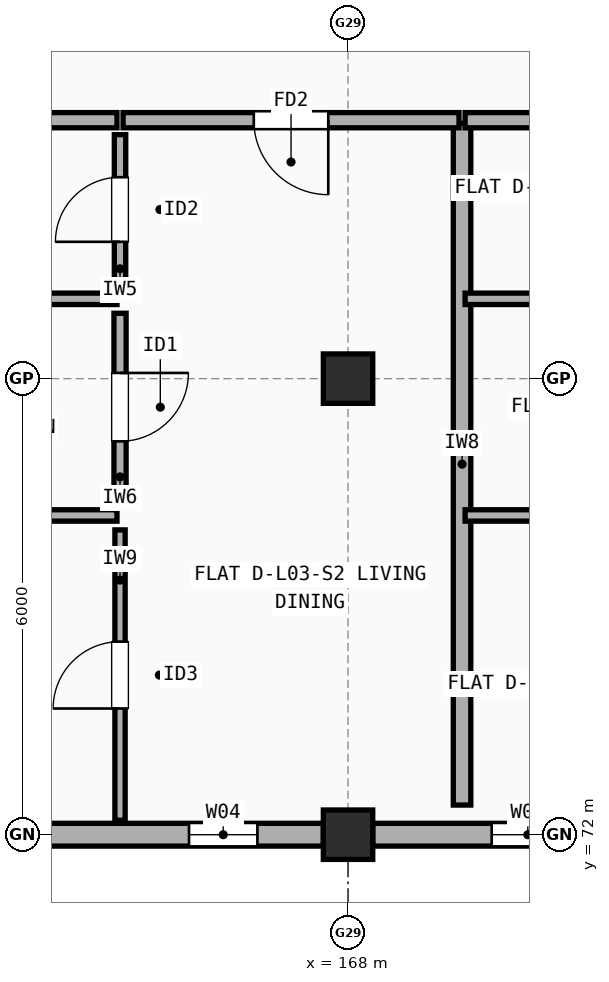
"""IFC4 building model, lengths in metres.
Left out: names, types, materials, properties, quantities, classifications, styles, units other than length and angle.
Written with IfcOpenShell. Run it as: python <this file> out.ifc"""

import sys

from ifc_helpers import new_model, si_unit, direction, frame, frame_2d, origin, origin_2d, place, context, subcontext, project, spatial, rectangle, extrude, element, fill, save


model = new_model("IFC4")
c1 = context("Model", 3, precision=1e-05, world=origin(), true_north=direction((0.0, 1.0)))
c2 = subcontext(c1, "Body", "Model", "MODEL_VIEW")
j1 = project(units=[si_unit("LENGTHUNIT", "METRE"), si_unit("PLANEANGLEUNIT", "RADIAN")], contexts=[c1])
p1 = place(None, origin())
s1 = spatial("IfcSite", under=j1, at=p1, CompositionType="ELEMENT")
p2 = place(p1, origin())
s2 = spatial("IfcBuilding", under=s1, at=p2, CompositionType="ELEMENT")
p3 = place(p2, frame((0.0, 0.0, 10.9)))
s3 = spatial("IfcBuildingStorey", under=s2, at=p3, CompositionType="ELEMENT", Elevation=10.9)
for number, where, z_axis, x_axis in (
    (1, (168.0, 72.0, 0.0), (0.0, 0.0, 1.0), (1.0, 0.0, 0.0)),
    (2, (168.0, 78.0, 0.0), (0.0, 0.0, 1.0), (1.0, 0.0, 0.0)),
):
    element("IfcColumn", number, at=place(p3, frame(where, z_axis=z_axis, x_axis=x_axis)), inside=s3, PredefinedType="COLUMN", context=c2, shape_type="SweptSolid", body=[
        extrude(rectangle(XDim=0.65, YDim=0.65, at=origin_2d()), origin(), (0.0, 0.0, 1.0), 2.96),
    ])
p4 = place(p3, frame((162.325, 72.0, 0.0), z_axis=(0.0, 0.0, 1.0), x_axis=(1.0, 0.0, 0.0)))
e3 = element("IfcWall", 3, at=p4, inside=s3, PredefinedType="STANDARD", context=c2, shape_type="SweptSolid", body=[
    extrude(rectangle(XDim=5.35, YDim=0.3, at=frame_2d((2.675, 0.0))), origin(), (0.0, 0.0, 1.0), 2.442),
])
p5 = place(p4, frame((0.893, 0.0, 0.9)))
e4 = element("IfcOpeningElement", 4, at=p5, cuts=e3, PredefinedType="OPENING", context=c2, shape_type="SweptSolid", body=[
    extrude(rectangle(XDim=0.85, YDim=1.25, at=frame_2d((0.425, 0.625))), frame((0.0, 0.16, 0.0), z_axis=(0.0, -1.0, 0.0), x_axis=(1.0, 0.0, 0.0)), (0.0, 0.0, 1.0), 0.32),
])
p6 = place(p4, frame((3.583, 0.0, 0.9)))
e5 = element("IfcOpeningElement", 5, at=p6, cuts=e3, PredefinedType="OPENING", context=c2, shape_type="SweptSolid", body=[
    extrude(rectangle(XDim=0.9, YDim=1.3, at=frame_2d((0.45, 0.65))), frame((0.0, 0.16, 0.0), z_axis=(0.0, -1.0, 0.0), x_axis=(1.0, 0.0, 0.0)), (0.0, 0.0, 1.0), 0.32),
])
p7 = place(p3, frame((168.325, 72.0, 0.0), z_axis=(0.0, 0.0, 1.0), x_axis=(1.0, 0.0, 0.0)))
e6 = element("IfcWall", 6, at=p7, inside=s3, PredefinedType="STANDARD", context=c2, shape_type="SweptSolid", body=[
    extrude(rectangle(XDim=5.35, YDim=0.3, at=frame_2d((2.675, 0.0))), origin(), (0.0, 0.0, 1.0), 2.442),
])
p8 = place(p7, frame((1.565, 0.0, 0.9)))
e7 = element("IfcOpeningElement", 7, at=p8, cuts=e6, PredefinedType="OPENING", context=c2, shape_type="SweptSolid", body=[
    extrude(rectangle(XDim=0.95, YDim=1.35, at=frame_2d((0.475, 0.675))), frame((0.0, 0.16, 0.0), z_axis=(0.0, -1.0, 0.0), x_axis=(1.0, 0.0, 0.0)), (0.0, 0.0, 1.0), 0.32),
])
p9 = place(p7, frame((4.05, 0.0, 0.9)))
e8 = element("IfcOpeningElement", 8, at=p9, cuts=e6, PredefinedType="OPENING", context=c2, shape_type="SweptSolid", body=[
    extrude(rectangle(XDim=0.95, YDim=1.35, at=frame_2d((0.475, 0.675))), frame((0.0, 0.16, 0.0), z_axis=(0.0, -1.0, 0.0), x_axis=(1.0, 0.0, 0.0)), (0.0, 0.0, 1.0), 0.32),
])
p10 = place(p3, frame((169.5, 72.39, 0.0), z_axis=(0.0, 0.0, 1.0), x_axis=(0.0, 1.0, 0.0)))
e9 = element("IfcWall", 9, at=p10, inside=s3, PredefinedType="SOLIDWALL", context=c2, shape_type="SweptSolid", body=[
    extrude(rectangle(XDim=8.97, YDim=0.23, at=frame_2d((4.485, 0.0))), origin(), (0.0, 0.0, 1.0), 2.442),
])
p11 = place(p3, frame((160.54, 81.4, 0.0), z_axis=(0.0, 0.0, 1.0), x_axis=(1.0, 0.0, 0.0)))
e10 = element("IfcWall", 10, at=p11, inside=s3, PredefinedType="SOLIDWALL", context=c2, shape_type="SweptSolid", body=[
    extrude(rectangle(XDim=4.42, YDim=0.2, at=frame_2d((2.21, 0.0))), origin(), (0.0, 0.0, 1.0), 2.508),
])
p12 = place(p3, frame((165.04, 81.4, 0.0), z_axis=(0.0, 0.0, 1.0), x_axis=(1.0, 0.0, 0.0)))
e11 = element("IfcWall", 11, at=p12, inside=s3, PredefinedType="SOLIDWALL", context=c2, shape_type="SweptSolid", body=[
    extrude(rectangle(XDim=4.42, YDim=0.2, at=frame_2d((2.21, 0.0))), origin(), (0.0, 0.0, 1.0), 2.458),
])
p13 = place(p12, frame((1.72, 0.0, 0.0)))
e12 = element("IfcOpeningElement", 12, at=p13, cuts=e11, PredefinedType="OPENING", context=c2, shape_type="SweptSolid", body=[
    extrude(rectangle(XDim=0.98, YDim=2.15, at=frame_2d((0.49, 1.075))), frame((0.0, 0.11, 0.0), z_axis=(0.0, -1.0, 0.0), x_axis=(1.0, 0.0, 0.0)), (0.0, 0.0, 1.0), 0.22),
])
p14 = place(p3, frame((165.0, 72.19, 0.0), z_axis=(0.0, 0.0, 1.0), x_axis=(0.0, 1.0, 0.0)))
e13 = element("IfcWall", 13, at=p14, inside=s3, PredefinedType="PARTITIONING", context=c2, shape_type="SweptSolid", body=[
    extrude(rectangle(XDim=3.82, YDim=0.135, at=frame_2d((1.91, 0.0))), origin(), (0.0, 0.0, 1.0), 2.96),
])
p15 = place(p14, frame((1.47, 0.0, 0.0)))
e14 = element("IfcOpeningElement", 14, at=p15, cuts=e13, PredefinedType="OPENING", context=c2, shape_type="SweptSolid", body=[
    extrude(rectangle(XDim=0.88, YDim=2.1, at=frame_2d((0.44, 1.05))), frame((0.0, 0.077, 0.0), z_axis=(0.0, -1.0, 0.0), x_axis=(1.0, 0.0, 0.0)), (0.0, 0.0, 1.0), 0.155),
])
p16 = place(p3, frame((165.0, 76.39, 0.0), z_axis=(0.0, 0.0, 1.0), x_axis=(0.0, 1.0, 0.0)))
e15 = element("IfcWall", 15, at=p16, inside=s3, PredefinedType="PLUMBINGWALL", context=c2, shape_type="SweptSolid", body=[
    extrude(rectangle(XDim=2.47, YDim=0.16, at=frame_2d((1.235, 0.0))), origin(), (0.0, 0.0, 1.0), 2.442),
])
p17 = place(p16, frame((0.785, 0.0, 0.0)))
e16 = element("IfcOpeningElement", 16, at=p17, cuts=e15, PredefinedType="OPENING", context=c2, shape_type="SweptSolid", body=[
    extrude(rectangle(XDim=0.9, YDim=2.1, at=frame_2d((0.45, 1.05))), frame((0.0, 0.09, 0.0), z_axis=(0.0, -1.0, 0.0), x_axis=(1.0, 0.0, 0.0)), (0.0, 0.0, 1.0), 0.18),
])
p18 = place(p3, frame((165.0, 79.24, 0.0), z_axis=(0.0, 0.0, 1.0), x_axis=(0.0, 1.0, 0.0)))
e17 = element("IfcWall", 17, at=p18, inside=s3, PredefinedType="PARTITIONING", context=c2, shape_type="SweptSolid", body=[
    extrude(rectangle(XDim=1.97, YDim=0.15, at=frame_2d((0.985, 0.0))), origin(), (0.0, 0.0, 1.0), 2.96),
])
p19 = place(p18, frame((0.56, 0.0, 0.0)))
e18 = element("IfcOpeningElement", 18, at=p19, cuts=e17, PredefinedType="OPENING", context=c2, shape_type="SweptSolid", body=[
    extrude(rectangle(XDim=0.85, YDim=2.1, at=frame_2d((0.425, 1.05))), frame((0.0, 0.085, 0.0), z_axis=(0.0, -1.0, 0.0), x_axis=(1.0, 0.0, 0.0)), (0.0, 0.0, 1.0), 0.17),
])
p20 = place(p3, frame((160.54, 76.2, 0.0), z_axis=(0.0, 0.0, 1.0), x_axis=(1.0, 0.0, 0.0)))
e19 = element("IfcWall", 19, at=p20, inside=s3, PredefinedType="PARTITIONING", context=c2, shape_type="SweptSolid", body=[
    extrude(rectangle(XDim=4.42, YDim=0.15, at=frame_2d((2.21, 0.0))), origin(), (0.0, 0.0, 1.0), 2.548),
])
p21 = place(p3, frame((160.54, 79.05, 0.0), z_axis=(0.0, 0.0, 1.0), x_axis=(1.0, 0.0, 0.0)))
e20 = element("IfcWall", 20, at=p21, inside=s3, PredefinedType="PARTITIONING", context=c2, shape_type="SweptSolid", body=[
    extrude(rectangle(XDim=4.42, YDim=0.15, at=frame_2d((2.21, 0.0))), origin(), (0.0, 0.0, 1.0), 2.508),
])
p22 = place(p3, frame((169.54, 81.4, 0.0), z_axis=(0.0, 0.0, 1.0), x_axis=(1.0, 0.0, 0.0)))
e21 = element("IfcWall", 21, at=p22, inside=s3, PredefinedType="SOLIDWALL", context=c2, shape_type="SweptSolid", body=[
    extrude(rectangle(XDim=4.42, YDim=0.2, at=frame_2d((2.21, 0.0))), origin(), (0.0, 0.0, 1.0), 2.508),
])
p23 = place(p3, frame((169.54, 76.2, 0.0), z_axis=(0.0, 0.0, 1.0), x_axis=(1.0, 0.0, 0.0)))
e22 = element("IfcWall", 22, at=p23, inside=s3, PredefinedType="PARTITIONING", context=c2, shape_type="SweptSolid", body=[
    extrude(rectangle(XDim=4.42, YDim=0.15, at=frame_2d((2.21, 0.0))), origin(), (0.0, 0.0, 1.0), 2.548),
])
p24 = place(p3, frame((169.54, 79.05, 0.0), z_axis=(0.0, 0.0, 1.0), x_axis=(1.0, 0.0, 0.0)))
e23 = element("IfcWall", 23, at=p24, inside=s3, PredefinedType="PARTITIONING", context=c2, shape_type="SweptSolid", body=[
    extrude(rectangle(XDim=4.42, YDim=0.15, at=frame_2d((2.21, 0.0))), origin(), (0.0, 0.0, 1.0), 2.508),
])
p25 = place(p6, origin())
e24 = element("IfcWindow", 24, at=p25, inside=s3, PartitioningType="SINGLE_PANEL", PredefinedType="WINDOW", context=c2, shape_type="SweptSolid", body=[
    extrude(rectangle(XDim=0.9, YDim=1.3, at=frame_2d((0.45, 0.65))), frame((0.0, 0.03, 0.0), z_axis=(0.0, -1.0, 0.0), x_axis=(1.0, 0.0, 0.0)), (0.0, 0.0, 1.0), 0.06),
])
fill(e5, e24)
p26 = place(p8, origin())
e25 = element("IfcWindow", 25, at=p26, inside=s3, PartitioningType="SINGLE_PANEL", PredefinedType="WINDOW", context=c2, shape_type="SweptSolid", body=[
    extrude(rectangle(XDim=0.95, YDim=1.35, at=frame_2d((0.475, 0.675))), frame((0.0, 0.03, 0.0), z_axis=(0.0, -1.0, 0.0), x_axis=(1.0, 0.0, 0.0)), (0.0, 0.0, 1.0), 0.06),
])
fill(e7, e25)
p27 = place(p13, origin())
e26 = element("IfcDoor", 26, at=p27, inside=s3, OperationType="SINGLE_SWING_RIGHT", PredefinedType="DOOR", context=c2, shape_type="SweptSolid", body=[
    extrude(rectangle(XDim=0.98, YDim=2.15, at=frame_2d((0.49, 1.075))), frame((0.0, 0.025, 0.0), z_axis=(0.0, -1.0, 0.0), x_axis=(1.0, 0.0, 0.0)), (0.0, 0.0, 1.0), 0.05),
])
fill(e12, e26)
p28 = place(p15, origin())
e27 = element("IfcDoor", 27, at=p28, inside=s3, OperationType="SINGLE_SWING_LEFT", PredefinedType="DOOR", context=c2, shape_type="SweptSolid", body=[
    extrude(rectangle(XDim=0.88, YDim=2.1, at=frame_2d((0.44, 1.05))), frame((0.0, 0.025, 0.0), z_axis=(0.0, -1.0, 0.0), x_axis=(1.0, 0.0, 0.0)), (0.0, 0.0, 1.0), 0.05),
])
fill(e14, e27)
p29 = place(p17, origin())
e28 = element("IfcDoor", 28, at=p29, inside=s3, OperationType="SINGLE_SWING_RIGHT", PredefinedType="DOOR", context=c2, shape_type="SweptSolid", body=[
    extrude(rectangle(XDim=0.9, YDim=2.1, at=frame_2d((0.45, 1.05))), frame((0.0, 0.025, 0.0), z_axis=(0.0, -1.0, 0.0), x_axis=(1.0, 0.0, 0.0)), (0.0, 0.0, 1.0), 0.05),
])
fill(e16, e28)
p30 = place(p19, origin())
e29 = element("IfcDoor", 29, at=p30, inside=s3, OperationType="SINGLE_SWING_LEFT", PredefinedType="DOOR", context=c2, shape_type="SweptSolid", body=[
    extrude(rectangle(XDim=0.85, YDim=2.1, at=frame_2d((0.425, 1.05))), frame((0.0, 0.025, 0.0), z_axis=(0.0, -1.0, 0.0), x_axis=(1.0, 0.0, 0.0)), (0.0, 0.0, 1.0), 0.05),
])
fill(e18, e29)
save(model, sys.argv[1])
